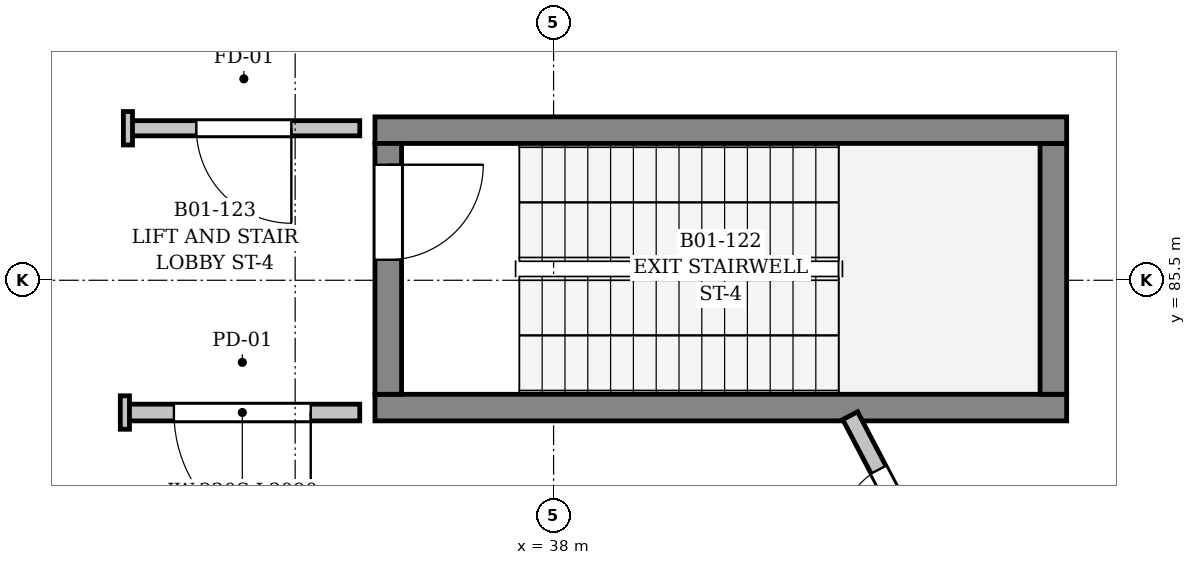
"""IFC4 building model, lengths in metres.
Left out: names, types, materials, properties, quantities, classifications, styles, units other than length and angle.
Written with IfcOpenShell. Run it as: python <this file> out.ifc"""

import sys

from ifc_helpers import new_model, si_unit, direction, frame, frame_2d, origin, place, context, subcontext, project, spatial, rectangle, extrude, element, fill, save


model = new_model("IFC4")
c1 = context("Model", 3, precision=1e-05, world=origin(), true_north=direction((0.0, 1.0)))
c2 = subcontext(c1, "Body", "Model", "MODEL_VIEW")
j1 = project(units=[si_unit("LENGTHUNIT", "METRE"), si_unit("PLANEANGLEUNIT", "RADIAN")], contexts=[c1])
p1 = place(None, origin())
s1 = spatial("IfcSite", under=j1, at=p1, CompositionType="ELEMENT")
p2 = place(p1, origin())
s2 = spatial("IfcBuilding", under=s1, at=p2, CompositionType="ELEMENT")
p3 = place(p2, frame((0.0, 0.0, -5.4)))
s3 = spatial("IfcBuildingStorey", under=s2, at=p3, CompositionType="ELEMENT", Elevation=-5.4)
p4 = place(p3, frame((21.874, 89.385, 0.0), z_axis=(0.0, 0.0, 1.0), x_axis=(0.719343876537, -0.694654149408, 0.0)))
e1 = element("IfcWall", 1, at=p4, inside=s3, PredefinedType="USERDEFINED", context=c2, shape_type="SweptSolid", body=[
    extrude(rectangle(XDim=28.419, YDim=0.55, at=frame_2d((14.209, 0.0))), origin(), (0.0, 0.0, 1.0), 5.05),
])
p5 = place(p3, frame((42.882, 70.238, 0.0), z_axis=(0.0, 0.0, 1.0), x_axis=(-0.719340261239, 0.694657893182, 0.0)))
e2 = element("IfcWall", 2, at=p5, inside=s3, PredefinedType="USERDEFINED", context=c2, shape_type="SweptSolid", body=[
    extrude(rectangle(XDim=31.415, YDim=0.55, at=frame_2d((15.708, 0.0))), origin(), (0.0, 0.0, 1.0), 5.05),
])
p6 = place(p3, frame((35.65, 83.825, 0.0), z_axis=(0.0, 0.0, 1.0), x_axis=(1.0, 0.0, 0.0)))
e3 = element("IfcWall", 3, at=p6, inside=s3, PredefinedType="SHEAR", context=c2, shape_type="SweptSolid", body=[
    extrude(rectangle(XDim=9.1, YDim=0.35, at=frame_2d((4.55, 0.0))), origin(), (0.0, 0.0, 1.0), 5.05),
])
p7 = place(p3, frame((44.575, 84.0, 0.0), z_axis=(0.0, 0.0, 1.0), x_axis=(0.0, 1.0, 0.0)))
e4 = element("IfcWall", 4, at=p7, inside=s3, PredefinedType="SHEAR", context=c2, shape_type="SweptSolid", body=[
    extrude(rectangle(XDim=3.3, YDim=0.35, at=frame_2d((1.65, 0.0))), origin(), (0.0, 0.0, 1.0), 5.05),
])
p8 = place(p3, frame((44.75, 87.475, 0.0), z_axis=(0.0, 0.0, 1.0), x_axis=(-1.0, 0.0, 0.0)))
e5 = element("IfcWall", 5, at=p8, inside=s3, PredefinedType="SHEAR", context=c2, shape_type="SweptSolid", body=[
    extrude(rectangle(XDim=9.1, YDim=0.35, at=frame_2d((4.55, 0.0))), origin(), (0.0, 0.0, 1.0), 5.05),
])
p9 = place(p3, frame((35.825, 87.3, 0.0), z_axis=(0.0, 0.0, 1.0), x_axis=(0.0, -1.0, 0.0)))
e6 = element("IfcWall", 6, at=p9, inside=s3, PredefinedType="SHEAR", context=c2, shape_type="SweptSolid", body=[
    extrude(rectangle(XDim=3.3, YDim=0.35, at=frame_2d((1.65, 0.0))), origin(), (0.0, 0.0, 1.0), 5.05),
])
p10 = place(p9, frame((0.28, 0.0, 0.0)))
e7 = element("IfcOpeningElement", 7, at=p10, cuts=e6, PredefinedType="OPENING", context=c2, shape_type="SweptSolid", body=[
    extrude(rectangle(XDim=1.25, YDim=2.2, at=frame_2d((0.625, 1.1))), frame((0.0, 0.185, 0.0), z_axis=(0.0, -1.0, 0.0), x_axis=(1.0, 0.0, 0.0)), (0.0, 0.0, 1.0), 0.37),
])
p11 = place(p3, frame((35.45, 87.5, 0.0), z_axis=(0.0, 0.0, 1.0), x_axis=(-1.0, 0.0, 0.0)))
e8 = element("IfcWall", 8, at=p11, inside=s3, PredefinedType="PARTITIONING", context=c2, shape_type="SweptSolid", body=[
    extrude(rectangle(XDim=3.05, YDim=0.2, at=frame_2d((1.525, 0.0))), origin(), (0.0, 0.0, 1.0), 4.04),
])
p12 = place(p11, frame((0.9, 0.0, 0.0)))
e9 = element("IfcOpeningElement", 9, at=p12, cuts=e8, PredefinedType="OPENING", context=c2, shape_type="SweptSolid", body=[
    extrude(rectangle(XDim=1.25, YDim=2.2, at=frame_2d((0.625, 1.1))), frame((0.0, 0.11, 0.0), z_axis=(0.0, -1.0, 0.0), x_axis=(1.0, 0.0, 0.0)), (0.0, 0.0, 1.0), 0.22),
])
p13 = place(p3, frame((35.45, 83.76, 0.0), z_axis=(0.0, 0.0, 1.0), x_axis=(-1.0, 0.0, 0.0)))
e10 = element("IfcWall", 10, at=p13, inside=s3, PredefinedType="SOLIDWALL", context=c2, shape_type="SweptSolid", body=[
    extrude(rectangle(XDim=3.09, YDim=0.22, at=frame_2d((1.545, 0.0))), origin(), (0.0, 0.0, 1.0), 4.39),
])
p14 = place(p13, frame((0.645, 0.0, 0.0)))
e11 = element("IfcOpeningElement", 11, at=p14, cuts=e10, PredefinedType="OPENING", context=c2, shape_type="SweptSolid", body=[
    extrude(rectangle(XDim=1.8, YDim=2.3, at=frame_2d((0.9, 1.15))), frame((0.0, 0.12, 0.0), z_axis=(0.0, -1.0, 0.0), x_axis=(1.0, 0.0, 0.0)), (0.0, 0.0, 1.0), 0.24),
])
p15 = place(p3, frame((43.098, 81.436, 0.0), z_axis=(0.0, 0.0, 1.0), x_axis=(-0.464297243823, 0.885679439401, 0.0)))
e12 = element("IfcWall", 12, at=p15, inside=s3, PredefinedType="SOLIDWALL", context=c2, shape_type="SweptSolid", body=[
    extrude(rectangle(XDim=2.577, YDim=0.22, at=frame_2d((1.289, 0.0))), origin(), (0.0, 0.0, 1.0), 4.34),
])
p16 = place(p15, frame((0.874, 0.0, 0.0)))
e13 = element("IfcOpeningElement", 13, at=p16, cuts=e12, PredefinedType="OPENING", context=c2, shape_type="SweptSolid", body=[
    extrude(rectangle(XDim=0.9, YDim=2.1, at=frame_2d((0.45, 1.05))), frame((0.0, 0.12, 0.0), z_axis=(0.0, -1.0, 0.0), x_axis=(1.0, 0.0, 0.0)), (0.0, 0.0, 1.0), 0.24),
])
p17 = place(p3, frame((32.4, 87.72, 0.0), z_axis=(0.0, 0.0, 1.0), x_axis=(0.0, -1.0, 0.0)))
e14 = element("IfcWall", 14, at=p17, inside=s3, PredefinedType="PARTITIONING", context=c2, shape_type="SweptSolid", body=[
    extrude(rectangle(XDim=0.44, YDim=0.12, at=frame_2d((0.22, 0.0))), origin(), (0.0, 0.0, 1.0), 5.05),
])
p18 = place(p3, frame((32.36, 83.98, 0.0), z_axis=(0.0, 0.0, 1.0), x_axis=(0.0, -1.0, 0.0)))
e15 = element("IfcWall", 15, at=p18, inside=s3, PredefinedType="PARTITIONING", context=c2, shape_type="SweptSolid", body=[
    extrude(rectangle(XDim=0.44, YDim=0.12, at=frame_2d((0.22, 0.0))), origin(), (0.0, 0.0, 1.0), 4.39),
])
p19 = place(p10, origin())
e16 = element("IfcDoor", 16, at=p19, inside=s3, OperationType="SINGLE_SWING_LEFT", PredefinedType="DOOR", context=c2, shape_type="SweptSolid", body=[
    extrude(rectangle(XDim=1.25, YDim=2.2, at=frame_2d((0.625, 1.1))), frame((0.0, 0.025, 0.0), z_axis=(0.0, -1.0, 0.0), x_axis=(1.0, 0.0, 0.0)), (0.0, 0.0, 1.0), 0.05),
])
fill(e7, e16)
p20 = place(p12, origin())
e17 = element("IfcDoor", 17, at=p20, inside=s3, OperationType="SINGLE_SWING_LEFT", PredefinedType="DOOR", context=c2, shape_type="SweptSolid", body=[
    extrude(rectangle(XDim=1.25, YDim=2.2, at=frame_2d((0.625, 1.1))), frame((0.0, 0.025, 0.0), z_axis=(0.0, -1.0, 0.0), x_axis=(1.0, 0.0, 0.0)), (0.0, 0.0, 1.0), 0.05),
])
fill(e9, e17)
p21 = place(p14, origin())
e18 = element("IfcDoor", 18, at=p21, inside=s3, OperationType="DOUBLE_DOOR_SINGLE_SWING", PredefinedType="DOOR", context=c2, shape_type="SweptSolid", body=[
    extrude(rectangle(XDim=1.8, YDim=2.3, at=frame_2d((0.9, 1.15))), frame((0.0, 0.025, 0.0), z_axis=(0.0, -1.0, 0.0), x_axis=(1.0, 0.0, 0.0)), (0.0, 0.0, 1.0), 0.05),
])
fill(e11, e18)
p22 = place(p16, origin())
e19 = element("IfcDoor", 19, at=p22, inside=s3, OperationType="SINGLE_SWING_RIGHT", PredefinedType="DOOR", context=c2, shape_type="SweptSolid", body=[
    extrude(rectangle(XDim=0.9, YDim=2.1, at=frame_2d((0.45, 1.05))), frame((0.0, 0.025, 0.0), z_axis=(0.0, -1.0, 0.0), x_axis=(1.0, 0.0, 0.0)), (0.0, 0.0, 1.0), 0.05),
])
fill(e13, e19)
save(model, sys.argv[1])
